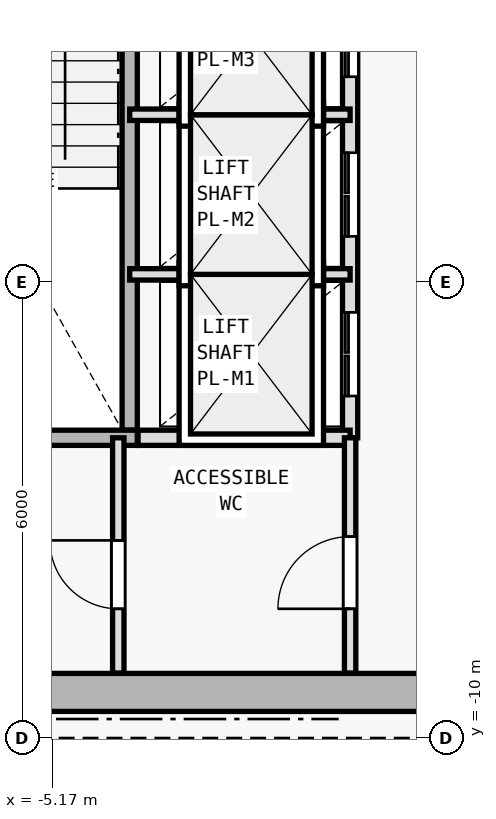
"""IFC4 building model, lengths in metres.
Left out: names, types, materials, properties, quantities, classifications, styles, units other than length and angle.
Written with IfcOpenShell. Run it as: python <this file> out.ifc"""

import sys

from ifc_helpers import new_model, si_unit, direction, frame, frame_2d, origin, place, context, subcontext, project, spatial, rectangle, extrude, element, fill, save


model = new_model("IFC4")
c1 = context("Model", 3, precision=1e-05, world=origin(), true_north=direction((0.0, 1.0)))
c2 = subcontext(c1, "Body", "Model", "MODEL_VIEW")
j1 = project(units=[si_unit("LENGTHUNIT", "METRE"), si_unit("PLANEANGLEUNIT", "RADIAN")], contexts=[c1])
p1 = place(None, origin())
s1 = spatial("IfcSite", under=j1, at=p1, CompositionType="ELEMENT")
p2 = place(p1, origin())
s2 = spatial("IfcBuilding", under=s1, at=p2, CompositionType="ELEMENT")
p3 = place(p2, frame((0.0, 0.0, 181.8)))
s3 = spatial("IfcBuildingStorey", under=s2, at=p3, CompositionType="ELEMENT", Elevation=181.8)
p4 = place(p3, frame((-7.95, -9.4, 0.0), z_axis=(0.0, 0.0, 1.0), x_axis=(1.0, 0.0, 0.0)))
e1 = element("IfcWall", 1, at=p4, inside=s3, PredefinedType="SHEAR", context=c2, shape_type="SweptSolid", body=[
    extrude(rectangle(XDim=15.9, YDim=0.5, at=frame_2d((7.95, 0.0))), origin(), (0.0, 0.0, 1.0), 3.28),
])
p5 = place(p4, frame((9.6, 0.0, 0.0)))
e2 = element("IfcOpeningElement", 2, at=p5, cuts=e1, PredefinedType="OPENING", context=c2, shape_type="SweptSolid", body=[
    extrude(rectangle(XDim=1.5, YDim=2.2, at=frame_2d((0.75, 1.1))), frame((0.0, 0.26, 0.0), z_axis=(0.0, -1.0, 0.0), x_axis=(1.0, 0.0, 0.0)), (0.0, 0.0, 1.0), 0.52),
])
p6 = place(p3, frame((-4.15, -5.95, 0.0), z_axis=(0.0, 0.0, 1.0), x_axis=(0.0, 1.0, 0.0)))
e3 = element("IfcWall", 3, at=p6, inside=s3, PredefinedType="SOLIDWALL", context=c2, shape_type="SweptSolid", body=[
    extrude(rectangle(XDim=7.2, YDim=0.2, at=frame_2d((3.6, 0.0))), origin(), (0.0, 0.0, 1.0), 3.28),
])
p7 = place(p3, frame((-1.25, -6.05, 0.0), z_axis=(0.0, 0.0, 1.0), x_axis=(0.0, 1.0, 0.0)))
e4 = element("IfcWall", 4, at=p7, inside=s3, PredefinedType="SOLIDWALL", context=c2, shape_type="SweptSolid", body=[
    extrude(rectangle(XDim=8.7, YDim=0.2, at=frame_2d((4.35, 0.0))), origin(), (0.0, 0.0, 1.0), 3.28),
])
p8 = place(p7, frame((0.55, 0.0, 0.0)))
e5 = element("IfcOpeningElement", 5, at=p8, cuts=e4, PredefinedType="OPENING", context=c2, shape_type="SweptSolid", body=[
    extrude(rectangle(XDim=1.1, YDim=2.15, at=frame_2d((0.55, 1.075))), frame((0.0, 0.11, 0.0), z_axis=(0.0, -1.0, 0.0), x_axis=(1.0, 0.0, 0.0)), (0.0, 0.0, 1.0), 0.22),
])
p9 = place(p7, frame((2.65, 0.0, 0.0)))
e6 = element("IfcOpeningElement", 6, at=p9, cuts=e4, PredefinedType="OPENING", context=c2, shape_type="SweptSolid", body=[
    extrude(rectangle(XDim=1.1, YDim=2.15, at=frame_2d((0.55, 1.075))), frame((0.0, 0.11, 0.0), z_axis=(0.0, -1.0, 0.0), x_axis=(1.0, 0.0, 0.0)), (0.0, 0.0, 1.0), 0.22),
])
p10 = place(p7, frame((4.75, 0.0, 0.0)))
e7 = element("IfcOpeningElement", 7, at=p10, cuts=e4, PredefinedType="OPENING", context=c2, shape_type="SweptSolid", body=[
    extrude(rectangle(XDim=1.1, YDim=2.15, at=frame_2d((0.55, 1.075))), frame((0.0, 0.11, 0.0), z_axis=(0.0, -1.0, 0.0), x_axis=(1.0, 0.0, 0.0)), (0.0, 0.0, 1.0), 0.22),
])
p11 = place(p7, frame((6.85, 0.0, 0.0)))
e8 = element("IfcOpeningElement", 8, at=p11, cuts=e4, PredefinedType="OPENING", context=c2, shape_type="SweptSolid", body=[
    extrude(rectangle(XDim=1.1, YDim=2.15, at=frame_2d((0.55, 1.075))), frame((0.0, 0.11, 0.0), z_axis=(0.0, -1.0, 0.0), x_axis=(1.0, 0.0, 0.0)), (0.0, 0.0, 1.0), 0.22),
])
for number, where, z_axis, x_axis in (
    (9, (-4.15, -3.9, 0.0), (0.0, 0.0, 1.0), (1.0, 0.0, 0.0)),
    (10, (-4.15, -1.8, 0.0), (0.0, 0.0, 1.0), (1.0, 0.0, 0.0)),
):
    element("IfcWall", number, at=place(p3, frame(where, z_axis=z_axis, x_axis=x_axis)), inside=s3, PredefinedType="PARTITIONING", context=c2, shape_type="SweptSolid", body=[
        extrude(rectangle(XDim=2.9, YDim=0.15, at=frame_2d((1.45, 0.0))), origin(), (0.0, 0.0, 1.0), 3.28),
    ])
p12 = place(p3, frame((-7.45, -6.05, 0.0), z_axis=(0.0, 0.0, 1.0), x_axis=(1.0, 0.0, 0.0)))
e11 = element("IfcWall", 11, at=p12, inside=s3, PredefinedType="SOLIDWALL", context=c2, shape_type="SweptSolid", body=[
    extrude(rectangle(XDim=3.4, YDim=0.2, at=frame_2d((1.7, 0.0))), origin(), (0.0, 0.0, 1.0), 3.28),
])
p13 = place(p3, frame((-4.04, -6.05, 0.0), z_axis=(0.0, 0.0, 1.0), x_axis=(1.0, 0.0, 0.0)))
e12 = element("IfcWall", 12, at=p13, inside=s3, PredefinedType="SOLIDWALL", context=c2, shape_type="SweptSolid", body=[
    extrude(rectangle(XDim=2.79, YDim=0.2, at=frame_2d((1.395, 0.0))), origin(), (0.0, 0.0, 1.0), 3.28),
])
p14 = place(p3, frame((-1.25, -9.145, 0.0), z_axis=(0.0, 0.0, 1.0), x_axis=(0.0, 1.0, 0.0)))
e13 = element("IfcWall", 13, at=p14, inside=s3, PredefinedType="PARTITIONING", context=c2, shape_type="SweptSolid", body=[
    extrude(rectangle(XDim=3.095, YDim=0.15, at=frame_2d((1.547, 0.0))), origin(), (0.0, 0.0, 1.0), 3.28),
])
p15 = place(p14, frame((0.845, 0.0, 0.0)))
e14 = element("IfcOpeningElement", 14, at=p15, cuts=e13, PredefinedType="OPENING", context=c2, shape_type="SweptSolid", body=[
    extrude(rectangle(XDim=0.95, YDim=2.1, at=frame_2d((0.475, 1.05))), frame((0.0, 0.085, 0.0), z_axis=(0.0, -1.0, 0.0), x_axis=(1.0, 0.0, 0.0)), (0.0, 0.0, 1.0), 0.17),
])
p16 = place(p3, frame((-4.3, -9.145, 0.0), z_axis=(0.0, 0.0, 1.0), x_axis=(0.0, 1.0, 0.0)))
e15 = element("IfcWall", 15, at=p16, inside=s3, PredefinedType="PARTITIONING", context=c2, shape_type="SweptSolid", body=[
    extrude(rectangle(XDim=3.095, YDim=0.15, at=frame_2d((1.547, 0.0))), origin(), (0.0, 0.0, 1.0), 3.28),
])
p17 = place(p16, frame((0.845, 0.0, 0.0)))
e16 = element("IfcOpeningElement", 16, at=p17, cuts=e15, PredefinedType="OPENING", context=c2, shape_type="SweptSolid", body=[
    extrude(rectangle(XDim=0.9, YDim=2.1, at=frame_2d((0.45, 1.05))), frame((0.0, 0.085, 0.0), z_axis=(0.0, -1.0, 0.0), x_axis=(1.0, 0.0, 0.0)), (0.0, 0.0, 1.0), 0.17),
])
p18 = place(p8, origin())
e17 = element("IfcDoor", 17, at=p18, inside=s3, OperationType="DOUBLE_DOOR_SLIDING", PredefinedType="DOOR", context=c2, shape_type="SweptSolid", body=[
    extrude(rectangle(XDim=1.1, YDim=2.15, at=frame_2d((0.55, 1.075))), frame((0.0, 0.025, 0.0), z_axis=(0.0, -1.0, 0.0), x_axis=(1.0, 0.0, 0.0)), (0.0, 0.0, 1.0), 0.05),
])
fill(e5, e17)
p19 = place(p9, origin())
e18 = element("IfcDoor", 18, at=p19, inside=s3, OperationType="DOUBLE_DOOR_SLIDING", PredefinedType="DOOR", context=c2, shape_type="SweptSolid", body=[
    extrude(rectangle(XDim=1.1, YDim=2.15, at=frame_2d((0.55, 1.075))), frame((0.0, 0.025, 0.0), z_axis=(0.0, -1.0, 0.0), x_axis=(1.0, 0.0, 0.0)), (0.0, 0.0, 1.0), 0.05),
])
fill(e6, e18)
p20 = place(p10, origin())
e19 = element("IfcDoor", 19, at=p20, inside=s3, OperationType="DOUBLE_DOOR_SLIDING", PredefinedType="DOOR", context=c2, shape_type="SweptSolid", body=[
    extrude(rectangle(XDim=1.1, YDim=2.15, at=frame_2d((0.55, 1.075))), frame((0.0, 0.025, 0.0), z_axis=(0.0, -1.0, 0.0), x_axis=(1.0, 0.0, 0.0)), (0.0, 0.0, 1.0), 0.05),
])
fill(e7, e19)
p21 = place(p15, origin())
e20 = element("IfcDoor", 20, at=p21, inside=s3, OperationType="SINGLE_SWING_LEFT", PredefinedType="DOOR", context=c2, shape_type="SweptSolid", body=[
    extrude(rectangle(XDim=0.95, YDim=2.1, at=frame_2d((0.475, 1.05))), frame((0.0, 0.025, 0.0), z_axis=(0.0, -1.0, 0.0), x_axis=(1.0, 0.0, 0.0)), (0.0, 0.0, 1.0), 0.05),
])
fill(e14, e20)
p22 = place(p17, origin())
e21 = element("IfcDoor", 21, at=p22, inside=s3, OperationType="SINGLE_SWING_RIGHT", PredefinedType="DOOR", context=c2, shape_type="SweptSolid", body=[
    extrude(rectangle(XDim=0.9, YDim=2.1, at=frame_2d((0.45, 1.05))), frame((0.0, 0.025, 0.0), z_axis=(0.0, -1.0, 0.0), x_axis=(1.0, 0.0, 0.0)), (0.0, 0.0, 1.0), 0.05),
])
fill(e16, e21)
save(model, sys.argv[1])
